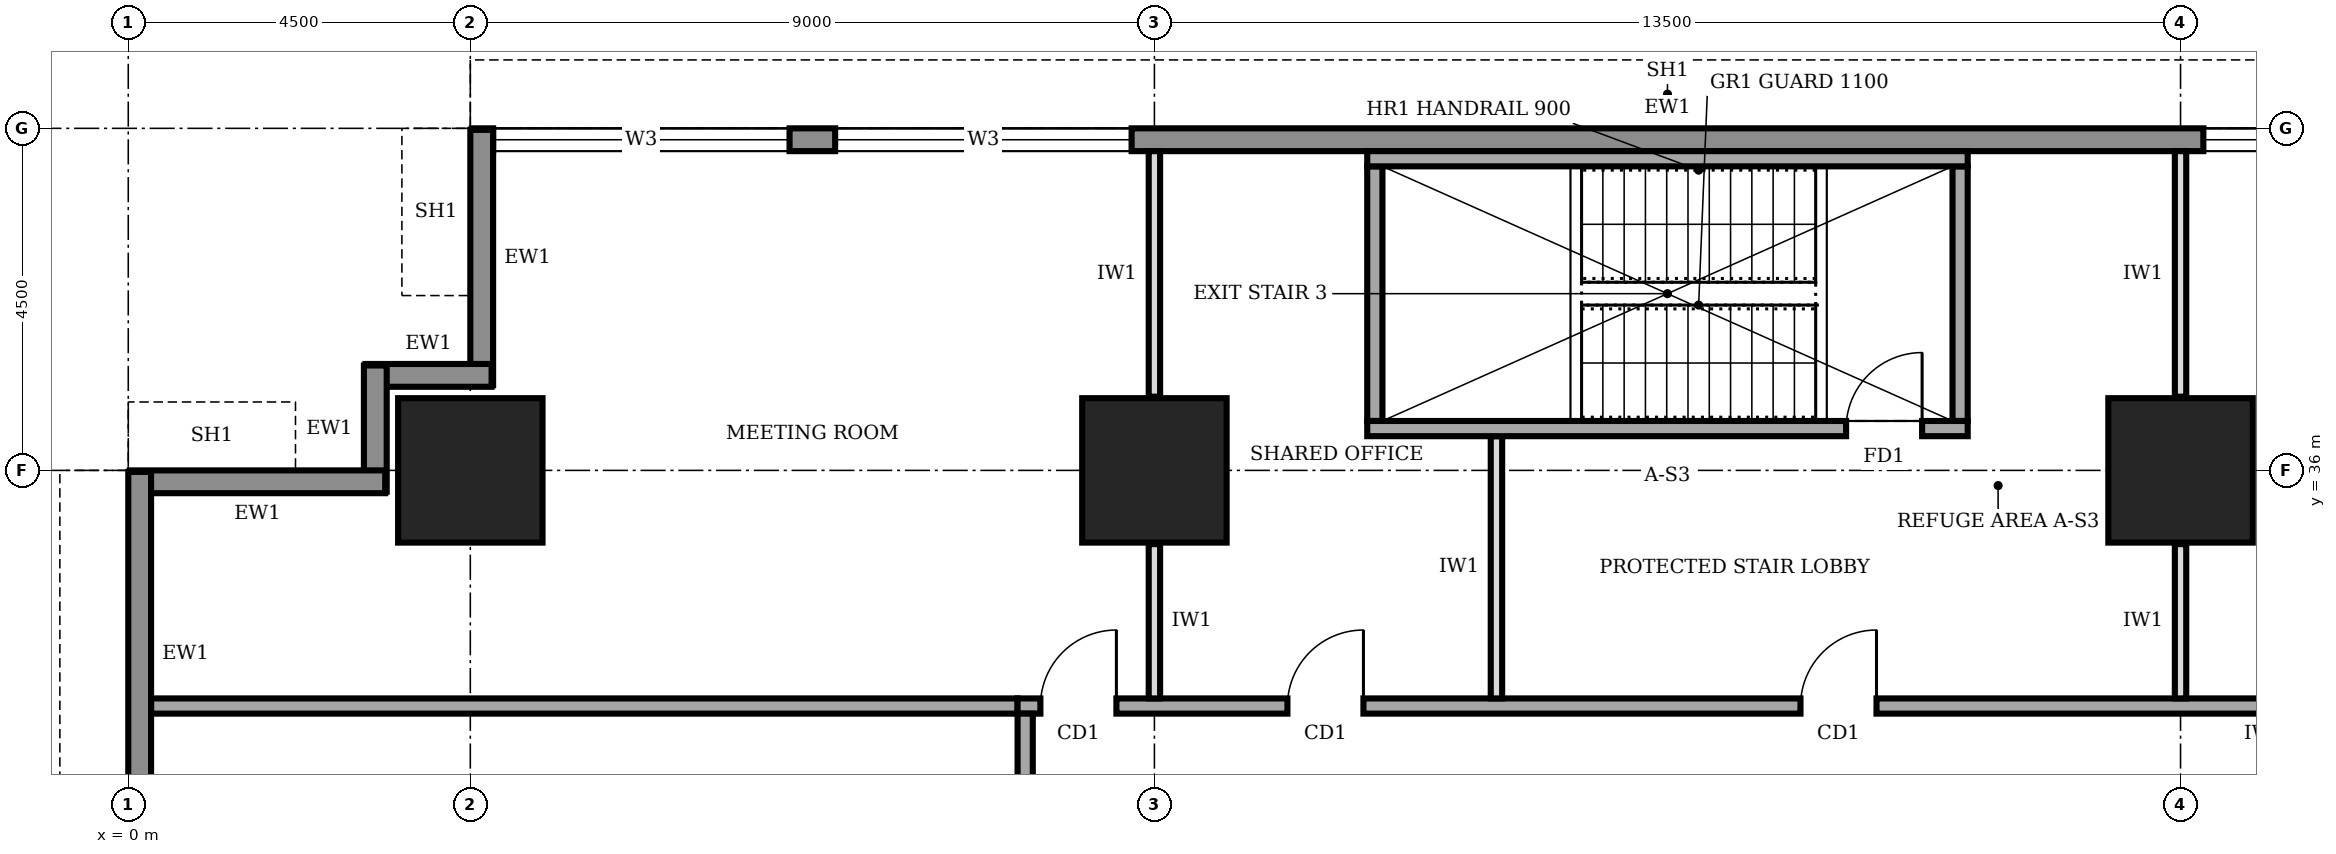
"""IFC4 building model, lengths in metres.
Left out: names, types, materials, properties, quantities, classifications, styles, units other than length and angle.
Written with IfcOpenShell. Run it as: python <this file> out.ifc"""

import sys

from ifc_helpers import new_model, si_unit, direction, frame, frame_2d, origin, origin_2d, place, context, subcontext, project, spatial, rectangle, extrude, element, fill, save


model = new_model("IFC4")
c1 = context("Model", 3, precision=1e-05, world=origin(), true_north=direction((0.0, 1.0)))
c2 = subcontext(c1, "Body", "Model", "MODEL_VIEW")
j1 = project(units=[si_unit("LENGTHUNIT", "METRE"), si_unit("PLANEANGLEUNIT", "RADIAN")], contexts=[c1])
p1 = place(None, origin())
s1 = spatial("IfcSite", under=j1, at=p1, CompositionType="ELEMENT")
p2 = place(p1, origin())
s2 = spatial("IfcBuilding", under=s1, at=p2, CompositionType="ELEMENT")
p3 = place(p2, frame((0.0, 0.0, 89.0)))
s3 = spatial("IfcBuildingStorey", under=s2, at=p3, CompositionType="ELEMENT", Elevation=89.0)
for number, where, z_axis, x_axis in (
    (1, (4.5, 36.0, 0.0), (0.0, 0.0, 1.0), (1.0, 0.0, 0.0)),
    (2, (13.5, 36.0, 0.0), (0.0, 0.0, 1.0), (1.0, 0.0, 0.0)),
    (3, (27.0, 36.0, 0.0), (0.0, 0.0, 1.0), (1.0, 0.0, 0.0)),
):
    element("IfcColumn", number, at=place(p3, frame(where, z_axis=z_axis, x_axis=x_axis)), inside=s3, PredefinedType="COLUMN", context=c2, shape_type="SweptSolid", body=[
        extrude(rectangle(XDim=1.9, YDim=1.9, at=origin_2d()), origin(), (0.0, 0.0, 1.0), 4.0),
    ])
p4 = place(p3, frame((35.98, 40.35, 0.0), z_axis=(0.0, 0.0, 1.0), x_axis=(-1.0, 0.0, 0.0)))
e4 = element("IfcWall", 4, at=p4, inside=s3, PredefinedType="STANDARD", context=c2, shape_type="SweptSolid", body=[
    extrude(rectangle(XDim=31.46, YDim=0.3, at=frame_2d((15.73, 0.0))), origin(), (0.0, 0.0, 1.0), 3.75),
])
p5 = place(p4, frame((27.28, 0.0, 0.95)))
e5 = element("IfcOpeningElement", 5, at=p5, cuts=e4, PredefinedType="OPENING", context=c2, shape_type="SweptSolid", body=[
    extrude(rectangle(XDim=3.9, YDim=1.8, at=frame_2d((1.95, 0.9))), frame((0.0, 0.16, 0.0), z_axis=(0.0, -1.0, 0.0), x_axis=(1.0, 0.0, 0.0)), (0.0, 0.0, 1.0), 0.32),
])
p6 = place(p4, frame((22.78, 0.0, 0.95)))
e6 = element("IfcOpeningElement", 6, at=p6, cuts=e4, PredefinedType="OPENING", context=c2, shape_type="SweptSolid", body=[
    extrude(rectangle(XDim=3.9, YDim=1.8, at=frame_2d((1.95, 0.9))), frame((0.0, 0.16, 0.0), z_axis=(0.0, -1.0, 0.0), x_axis=(1.0, 0.0, 0.0)), (0.0, 0.0, 1.0), 0.32),
])
p7 = place(p4, frame((4.78, 0.0, 0.95)))
e7 = element("IfcOpeningElement", 7, at=p7, cuts=e4, PredefinedType="OPENING", context=c2, shape_type="SweptSolid", body=[
    extrude(rectangle(XDim=3.9, YDim=1.8, at=frame_2d((1.95, 0.9))), frame((0.0, 0.16, 0.0), z_axis=(0.0, -1.0, 0.0), x_axis=(1.0, 0.0, 0.0)), (0.0, 0.0, 1.0), 0.32),
])
p8 = place(p3, frame((4.65, 40.48, 0.0), z_axis=(0.0, 0.0, 1.0), x_axis=(0.0, -1.0, 0.0)))
e8 = element("IfcWall", 8, at=p8, inside=s3, PredefinedType="STANDARD", context=c2, shape_type="SweptSolid", body=[
    extrude(rectangle(XDim=3.36, YDim=0.3, at=frame_2d((1.68, 0.0))), origin(), (0.0, 0.0, 1.0), 2.85),
])
for number, where, z_axis, x_axis in (
    (9, (4.78, 37.25, 0.0), (0.0, 0.0, 1.0), (-1.0, 0.0, 0.0)),
    (10, (3.25, 37.38, 0.0), (0.0, 0.0, 1.0), (0.0, -1.0, 0.0)),
):
    element("IfcWall", number, at=place(p3, frame(where, z_axis=z_axis, x_axis=x_axis)), inside=s3, PredefinedType="STANDARD", context=c2, shape_type="SweptSolid", body=[
        extrude(rectangle(XDim=1.66, YDim=0.3, at=frame_2d((0.83, 0.0))), origin(), (0.0, 0.0, 1.0), 3.75),
    ])
p9 = place(p3, frame((3.38, 35.85, 0.0), z_axis=(0.0, 0.0, 1.0), x_axis=(-1.0, 0.0, 0.0)))
e11 = element("IfcWall", 11, at=p9, inside=s3, PredefinedType="STANDARD", context=c2, shape_type="SweptSolid", body=[
    extrude(rectangle(XDim=3.36, YDim=0.3, at=frame_2d((1.68, 0.0))), origin(), (0.0, 0.0, 1.0), 2.85),
])
p10 = place(p3, frame((0.15, 35.98, 0.0), z_axis=(0.0, 0.0, 1.0), x_axis=(0.0, -1.0, 0.0)))
e12 = element("IfcWall", 12, at=p10, inside=s3, PredefinedType="STANDARD", context=c2, shape_type="SweptSolid", body=[
    extrude(rectangle(XDim=31.46, YDim=0.3, at=frame_2d((15.73, 0.0))), origin(), (0.0, 0.0, 1.0), 3.75),
])
p11 = place(p10, frame((27.28, 0.0, 0.95)))
e13 = element("IfcOpeningElement", 13, at=p11, cuts=e12, PredefinedType="OPENING", context=c2, shape_type="SweptSolid", body=[
    extrude(rectangle(XDim=3.9, YDim=1.8, at=frame_2d((1.95, 0.9))), frame((0.0, 0.16, 0.0), z_axis=(0.0, -1.0, 0.0), x_axis=(1.0, 0.0, 0.0)), (0.0, 0.0, 1.0), 0.32),
])
p12 = place(p10, frame((22.78, 0.0, 0.95)))
e14 = element("IfcOpeningElement", 14, at=p12, cuts=e12, PredefinedType="OPENING", context=c2, shape_type="SweptSolid", body=[
    extrude(rectangle(XDim=3.9, YDim=1.8, at=frame_2d((1.95, 0.9))), frame((0.0, 0.16, 0.0), z_axis=(0.0, -1.0, 0.0), x_axis=(1.0, 0.0, 0.0)), (0.0, 0.0, 1.0), 0.32),
])
p13 = place(p10, frame((18.28, 0.0, 0.95)))
e15 = element("IfcOpeningElement", 15, at=p13, cuts=e12, PredefinedType="OPENING", context=c2, shape_type="SweptSolid", body=[
    extrude(rectangle(XDim=3.9, YDim=1.8, at=frame_2d((1.95, 0.9))), frame((0.0, 0.16, 0.0), z_axis=(0.0, -1.0, 0.0), x_axis=(1.0, 0.0, 0.0)), (0.0, 0.0, 1.0), 0.32),
])
p14 = place(p10, frame((13.78, 0.0, 0.95)))
e16 = element("IfcOpeningElement", 16, at=p14, cuts=e12, PredefinedType="OPENING", context=c2, shape_type="SweptSolid", body=[
    extrude(rectangle(XDim=3.9, YDim=1.8, at=frame_2d((1.95, 0.9))), frame((0.0, 0.16, 0.0), z_axis=(0.0, -1.0, 0.0), x_axis=(1.0, 0.0, 0.0)), (0.0, 0.0, 1.0), 0.32),
])
p15 = place(p10, frame((9.28, 0.0, 0.95)))
e17 = element("IfcOpeningElement", 17, at=p15, cuts=e12, PredefinedType="OPENING", context=c2, shape_type="SweptSolid", body=[
    extrude(rectangle(XDim=3.9, YDim=1.8, at=frame_2d((1.95, 0.9))), frame((0.0, 0.16, 0.0), z_axis=(0.0, -1.0, 0.0), x_axis=(1.0, 0.0, 0.0)), (0.0, 0.0, 1.0), 0.32),
])
p16 = place(p10, frame((4.78, 0.0, 0.95)))
e18 = element("IfcOpeningElement", 18, at=p16, cuts=e12, PredefinedType="OPENING", context=c2, shape_type="SweptSolid", body=[
    extrude(rectangle(XDim=3.9, YDim=1.8, at=frame_2d((1.95, 0.9))), frame((0.0, 0.16, 0.0), z_axis=(0.0, -1.0, 0.0), x_axis=(1.0, 0.0, 0.0)), (0.0, 0.0, 1.0), 0.32),
])
p17 = place(p3, frame((40.2, 32.9, 0.0), z_axis=(0.0, 0.0, 1.0), x_axis=(-1.0, 0.0, 0.0)))
e19 = element("IfcWall", 19, at=p17, inside=s3, PredefinedType="SOLIDWALL", context=c2, shape_type="SweptSolid", body=[
    extrude(rectangle(XDim=28.5, YDim=0.2, at=frame_2d((14.25, 0.0))), origin(), (0.0, 0.0, 1.0), 3.75),
])
p18 = place(p17, frame((27.2, 0.0, 0.0)))
e20 = element("IfcOpeningElement", 20, at=p18, cuts=e19, PredefinedType="OPENING", context=c2, shape_type="SweptSolid", body=[
    extrude(rectangle(XDim=1.0, YDim=2.1, at=frame_2d((0.5, 1.05))), frame((0.0, 0.11, 0.0), z_axis=(0.0, -1.0, 0.0), x_axis=(1.0, 0.0, 0.0)), (0.0, 0.0, 1.0), 0.22),
])
p19 = place(p17, frame((23.95, 0.0, 0.0)))
e21 = element("IfcOpeningElement", 21, at=p19, cuts=e19, PredefinedType="OPENING", context=c2, shape_type="SweptSolid", body=[
    extrude(rectangle(XDim=1.0, YDim=2.1, at=frame_2d((0.5, 1.05))), frame((0.0, 0.11, 0.0), z_axis=(0.0, -1.0, 0.0), x_axis=(1.0, 0.0, 0.0)), (0.0, 0.0, 1.0), 0.22),
])
p20 = place(p17, frame((17.2, 0.0, 0.0)))
e22 = element("IfcOpeningElement", 22, at=p20, cuts=e19, PredefinedType="OPENING", context=c2, shape_type="SweptSolid", body=[
    extrude(rectangle(XDim=1.0, YDim=2.1, at=frame_2d((0.5, 1.05))), frame((0.0, 0.11, 0.0), z_axis=(0.0, -1.0, 0.0), x_axis=(1.0, 0.0, 0.0)), (0.0, 0.0, 1.0), 0.22),
])
p21 = place(p17, frame((6.0, 0.0, 0.0)))
e23 = element("IfcOpeningElement", 23, at=p21, cuts=e19, PredefinedType="OPENING", context=c2, shape_type="SweptSolid", body=[
    extrude(rectangle(XDim=1.0, YDim=2.1, at=frame_2d((0.5, 1.05))), frame((0.0, 0.11, 0.0), z_axis=(0.0, -1.0, 0.0), x_axis=(1.0, 0.0, 0.0)), (0.0, 0.0, 1.0), 0.22),
])
p22 = place(p3, frame((11.8, 32.8, 0.0), z_axis=(0.0, 0.0, 1.0), x_axis=(0.0, -1.0, 0.0)))
e24 = element("IfcWall", 24, at=p22, inside=s3, PredefinedType="SOLIDWALL", context=c2, shape_type="SweptSolid", body=[
    extrude(rectangle(XDim=25.3, YDim=0.2, at=frame_2d((12.65, 0.0))), origin(), (0.0, 0.0, 1.0), 3.75),
])
p23 = place(p22, frame((21.8, 0.0, 0.0)))
e25 = element("IfcOpeningElement", 25, at=p23, cuts=e24, PredefinedType="OPENING", context=c2, shape_type="SweptSolid", body=[
    extrude(rectangle(XDim=1.0, YDim=2.1, at=frame_2d((0.5, 1.05))), frame((0.0, 0.11, 0.0), z_axis=(0.0, -1.0, 0.0), x_axis=(1.0, 0.0, 0.0)), (0.0, 0.0, 1.0), 0.22),
])
p24 = place(p22, frame((17.15, 0.0, 0.0)))
e26 = element("IfcOpeningElement", 26, at=p24, cuts=e24, PredefinedType="OPENING", context=c2, shape_type="SweptSolid", body=[
    extrude(rectangle(XDim=0.9, YDim=2.1, at=frame_2d((0.45, 1.05))), frame((0.0, 0.11, 0.0), z_axis=(0.0, -1.0, 0.0), x_axis=(1.0, 0.0, 0.0)), (0.0, 0.0, 1.0), 0.22),
])
p25 = place(p22, frame((12.35, 0.0, 0.0)))
e27 = element("IfcOpeningElement", 27, at=p25, cuts=e24, PredefinedType="OPENING", context=c2, shape_type="SweptSolid", body=[
    extrude(rectangle(XDim=0.9, YDim=2.1, at=frame_2d((0.45, 1.05))), frame((0.0, 0.11, 0.0), z_axis=(0.0, -1.0, 0.0), x_axis=(1.0, 0.0, 0.0)), (0.0, 0.0, 1.0), 0.22),
])
p26 = place(p22, frame((9.3, 0.0, 0.0)))
e28 = element("IfcOpeningElement", 28, at=p26, cuts=e24, PredefinedType="OPENING", context=c2, shape_type="SweptSolid", body=[
    extrude(rectangle(XDim=0.9, YDim=2.1, at=frame_2d((0.45, 1.05))), frame((0.0, 0.11, 0.0), z_axis=(0.0, -1.0, 0.0), x_axis=(1.0, 0.0, 0.0)), (0.0, 0.0, 1.0), 0.22),
])
p27 = place(p22, frame((6.3, 0.0, 0.0)))
e29 = element("IfcOpeningElement", 29, at=p27, cuts=e24, PredefinedType="OPENING", context=c2, shape_type="SweptSolid", body=[
    extrude(rectangle(XDim=1.0, YDim=2.1, at=frame_2d((0.5, 1.05))), frame((0.0, 0.11, 0.0), z_axis=(0.0, -1.0, 0.0), x_axis=(1.0, 0.0, 0.0)), (0.0, 0.0, 1.0), 0.22),
])
p28 = place(p22, frame((14.4, 0.0, 0.0)))
e30 = element("IfcOpeningElement", 30, at=p28, cuts=e24, PredefinedType="OPENING", context=c2, shape_type="SweptSolid", body=[
    extrude(rectangle(XDim=1.0, YDim=2.1, at=frame_2d((0.5, 1.05))), frame((0.0, 0.11, 0.0), z_axis=(0.0, -1.0, 0.0), x_axis=(1.0, 0.0, 0.0)), (0.0, 0.0, 1.0), 0.22),
])
p29 = place(p22, frame((2.3, 0.0, 0.0)))
e31 = element("IfcOpeningElement", 31, at=p29, cuts=e24, PredefinedType="OPENING", context=c2, shape_type="SweptSolid", body=[
    extrude(rectangle(XDim=1.0, YDim=2.1, at=frame_2d((0.5, 1.05))), frame((0.0, 0.11, 0.0), z_axis=(0.0, -1.0, 0.0), x_axis=(1.0, 0.0, 0.0)), (0.0, 0.0, 1.0), 0.22),
])
p30 = place(p3, frame((0.3, 32.9, 0.0), z_axis=(0.0, 0.0, 1.0), x_axis=(1.0, 0.0, 0.0)))
e32 = element("IfcWall", 32, at=p30, inside=s3, PredefinedType="SOLIDWALL", context=c2, shape_type="SweptSolid", body=[
    extrude(rectangle(XDim=11.4, YDim=0.2, at=frame_2d((5.7, 0.0))), origin(), (0.0, 0.0, 1.0), 3.75),
])
p31 = place(p3, frame((13.5, 33.0, 0.0), z_axis=(0.0, 0.0, 1.0), x_axis=(0.0, 1.0, 0.0)))
e33 = element("IfcWall", 33, at=p31, inside=s3, PredefinedType="PARTITIONING", context=c2, shape_type="SweptSolid", body=[
    extrude(rectangle(XDim=2.03, YDim=0.15, at=frame_2d((1.015, 0.0))), origin(), (0.0, 0.0, 1.0), 2.85),
])
p32 = place(p3, frame((13.5, 36.97, 0.0), z_axis=(0.0, 0.0, 1.0), x_axis=(0.0, 1.0, 0.0)))
e34 = element("IfcWall", 34, at=p32, inside=s3, PredefinedType="PARTITIONING", context=c2, shape_type="SweptSolid", body=[
    extrude(rectangle(XDim=3.23, YDim=0.15, at=frame_2d((1.615, 0.0))), origin(), (0.0, 0.0, 1.0), 2.85),
])
p33 = place(p3, frame((18.0, 33.0, 0.0), z_axis=(0.0, 0.0, 1.0), x_axis=(0.0, 1.0, 0.0)))
e35 = element("IfcWall", 35, at=p33, inside=s3, PredefinedType="PARTITIONING", context=c2, shape_type="SweptSolid", body=[
    extrude(rectangle(XDim=3.45, YDim=0.15, at=frame_2d((1.725, 0.0))), origin(), (0.0, 0.0, 1.0), 3.75),
])
p34 = place(p3, frame((27.0, 33.0, 0.0), z_axis=(0.0, 0.0, 1.0), x_axis=(0.0, 1.0, 0.0)))
e36 = element("IfcWall", 36, at=p34, inside=s3, PredefinedType="PARTITIONING", context=c2, shape_type="SweptSolid", body=[
    extrude(rectangle(XDim=2.03, YDim=0.15, at=frame_2d((1.015, 0.0))), origin(), (0.0, 0.0, 1.0), 2.85),
])
p35 = place(p3, frame((27.0, 36.97, 0.0), z_axis=(0.0, 0.0, 1.0), x_axis=(0.0, 1.0, 0.0)))
e37 = element("IfcWall", 37, at=p35, inside=s3, PredefinedType="PARTITIONING", context=c2, shape_type="SweptSolid", body=[
    extrude(rectangle(XDim=3.23, YDim=0.15, at=frame_2d((1.615, 0.0))), origin(), (0.0, 0.0, 1.0), 2.85),
])
p36 = place(p3, frame((16.3, 36.55, 0.0), z_axis=(0.0, 0.0, 1.0), x_axis=(1.0, 0.0, 0.0)))
e38 = element("IfcWall", 38, at=p36, inside=s3, PredefinedType="SOLIDWALL", context=c2, shape_type="SweptSolid", body=[
    extrude(rectangle(XDim=7.9, YDim=0.2, at=frame_2d((3.95, 0.0))), origin(), (0.0, 0.0, 1.0), 3.75),
])
p37 = place(p36, frame((6.3, 0.0, 0.0)))
e39 = element("IfcOpeningElement", 39, at=p37, cuts=e38, PredefinedType="OPENING", context=c2, shape_type="SweptSolid", body=[
    extrude(rectangle(XDim=1.0, YDim=2.1, at=frame_2d((0.5, 1.05))), frame((0.0, 0.11, 0.0), z_axis=(0.0, -1.0, 0.0), x_axis=(1.0, 0.0, 0.0)), (0.0, 0.0, 1.0), 0.22),
])
p38 = place(p3, frame((16.3, 40.1, 0.0), z_axis=(0.0, 0.0, 1.0), x_axis=(1.0, 0.0, 0.0)))
e40 = element("IfcWall", 40, at=p38, inside=s3, PredefinedType="SOLIDWALL", context=c2, shape_type="SweptSolid", body=[
    extrude(rectangle(XDim=7.9, YDim=0.2, at=frame_2d((3.95, 0.0))), origin(), (0.0, 0.0, 1.0), 3.75),
])
for number, where, z_axis, x_axis in (
    (41, (16.4, 36.65, 0.0), (0.0, 0.0, 1.0), (0.0, 1.0, 0.0)),
    (42, (24.1, 36.65, 0.0), (0.0, 0.0, 1.0), (0.0, 1.0, 0.0)),
):
    element("IfcWall", number, at=place(p3, frame(where, z_axis=z_axis, x_axis=x_axis)), inside=s3, PredefinedType="SOLIDWALL", context=c2, shape_type="SweptSolid", body=[
        extrude(rectangle(XDim=3.35, YDim=0.2, at=frame_2d((1.675, 0.0))), origin(), (0.0, 0.0, 1.0), 3.75),
    ])
p39 = place(p5, origin())
e43 = element("IfcWindow", 43, at=p39, inside=s3, PartitioningType="SINGLE_PANEL", PredefinedType="WINDOW", context=c2, shape_type="SweptSolid", body=[
    extrude(rectangle(XDim=3.9, YDim=1.8, at=frame_2d((1.95, 0.9))), frame((0.0, 0.03, 0.0), z_axis=(0.0, -1.0, 0.0), x_axis=(1.0, 0.0, 0.0)), (0.0, 0.0, 1.0), 0.06),
])
fill(e5, e43)
p40 = place(p6, origin())
e44 = element("IfcWindow", 44, at=p40, inside=s3, PartitioningType="SINGLE_PANEL", PredefinedType="WINDOW", context=c2, shape_type="SweptSolid", body=[
    extrude(rectangle(XDim=3.9, YDim=1.8, at=frame_2d((1.95, 0.9))), frame((0.0, 0.03, 0.0), z_axis=(0.0, -1.0, 0.0), x_axis=(1.0, 0.0, 0.0)), (0.0, 0.0, 1.0), 0.06),
])
fill(e6, e44)
p41 = place(p7, origin())
e45 = element("IfcWindow", 45, at=p41, inside=s3, PartitioningType="SINGLE_PANEL", PredefinedType="WINDOW", context=c2, shape_type="SweptSolid", body=[
    extrude(rectangle(XDim=3.9, YDim=1.8, at=frame_2d((1.95, 0.9))), frame((0.0, 0.03, 0.0), z_axis=(0.0, -1.0, 0.0), x_axis=(1.0, 0.0, 0.0)), (0.0, 0.0, 1.0), 0.06),
])
fill(e7, e45)
p42 = place(p18, frame((1.0, 0.0, 0.0), z_axis=(0.0, 0.0, 1.0), x_axis=(-1.0, 0.0, 0.0)))
e46 = element("IfcDoor", 46, at=p42, inside=s3, OperationType="SINGLE_SWING_RIGHT", PredefinedType="DOOR", context=c2, shape_type="SweptSolid", body=[
    extrude(rectangle(XDim=1.0, YDim=2.1, at=frame_2d((0.5, 1.05))), frame((0.0, 0.025, 0.0), z_axis=(0.0, -1.0, 0.0), x_axis=(1.0, 0.0, 0.0)), (0.0, 0.0, 1.0), 0.05),
])
fill(e20, e46)
p43 = place(p19, frame((1.0, 0.0, 0.0), z_axis=(0.0, 0.0, 1.0), x_axis=(-1.0, 0.0, 0.0)))
e47 = element("IfcDoor", 47, at=p43, inside=s3, OperationType="SINGLE_SWING_RIGHT", PredefinedType="DOOR", context=c2, shape_type="SweptSolid", body=[
    extrude(rectangle(XDim=1.0, YDim=2.1, at=frame_2d((0.5, 1.05))), frame((0.0, 0.025, 0.0), z_axis=(0.0, -1.0, 0.0), x_axis=(1.0, 0.0, 0.0)), (0.0, 0.0, 1.0), 0.05),
])
fill(e21, e47)
p44 = place(p20, frame((1.0, 0.0, 0.0), z_axis=(0.0, 0.0, 1.0), x_axis=(-1.0, 0.0, 0.0)))
e48 = element("IfcDoor", 48, at=p44, inside=s3, OperationType="SINGLE_SWING_RIGHT", PredefinedType="DOOR", context=c2, shape_type="SweptSolid", body=[
    extrude(rectangle(XDim=1.0, YDim=2.1, at=frame_2d((0.5, 1.05))), frame((0.0, 0.025, 0.0), z_axis=(0.0, -1.0, 0.0), x_axis=(1.0, 0.0, 0.0)), (0.0, 0.0, 1.0), 0.05),
])
fill(e22, e48)
p45 = place(p37, origin())
e49 = element("IfcDoor", 49, at=p45, inside=s3, OperationType="SINGLE_SWING_RIGHT", PredefinedType="DOOR", context=c2, shape_type="SweptSolid", body=[
    extrude(rectangle(XDim=1.0, YDim=2.1, at=frame_2d((0.5, 1.05))), frame((0.0, 0.025, 0.0), z_axis=(0.0, -1.0, 0.0), x_axis=(1.0, 0.0, 0.0)), (0.0, 0.0, 1.0), 0.05),
])
fill(e39, e49)
save(model, sys.argv[1])
